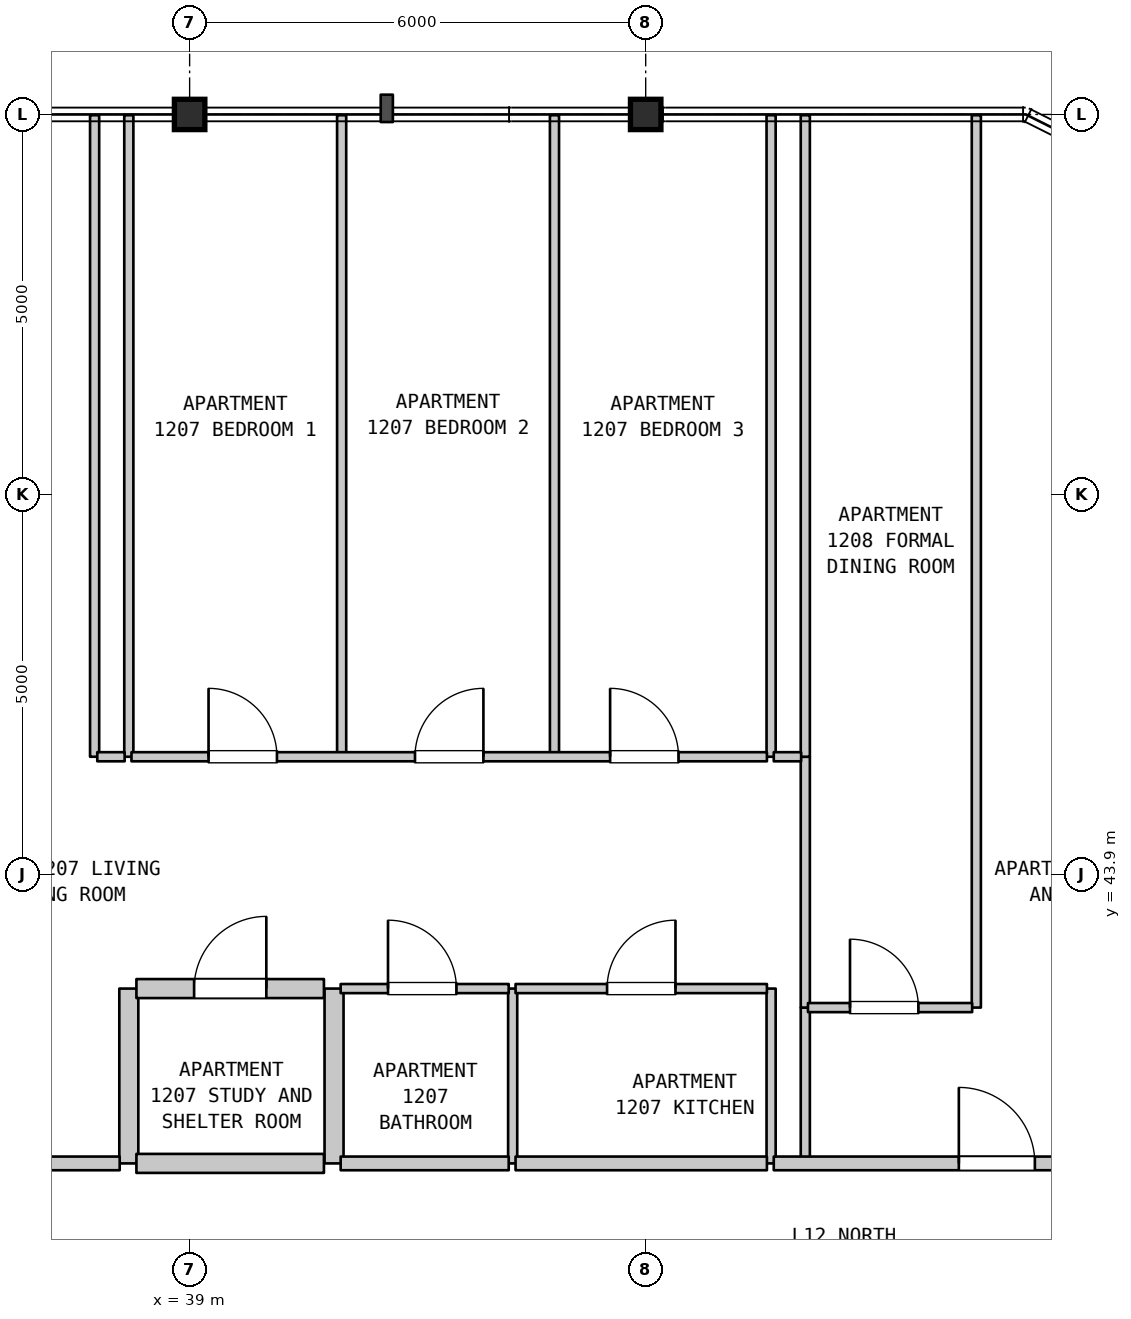
"""IFC4 building model, lengths in metres.
Left out: names, types, materials, properties, quantities, classifications, styles, units other than length and angle.
Written with IfcOpenShell. Run it as: python <this file> out.ifc"""

import sys

from ifc_helpers import new_model, si_unit, direction, frame, frame_2d, origin, origin_2d, place, context, subcontext, project, spatial, rectangle, i_section, extrude, element, fill, save


model = new_model("IFC4")
c1 = context("Model", 3, precision=1e-05, world=origin(), true_north=direction((0.0, 1.0)))
c2 = subcontext(c1, "Body", "Model", "MODEL_VIEW")
j1 = project(units=[si_unit("LENGTHUNIT", "METRE"), si_unit("PLANEANGLEUNIT", "RADIAN")], contexts=[c1])
p1 = place(None, origin())
s1 = spatial("IfcSite", under=j1, at=p1, CompositionType="ELEMENT")
p2 = place(p1, origin())
s2 = spatial("IfcBuilding", under=s1, at=p2, CompositionType="ELEMENT")
p3 = place(p2, frame((0.0, 0.0, 53.6)))
s3 = spatial("IfcBuildingStorey", under=s2, at=p3, CompositionType="ELEMENT", Elevation=53.6)
for number, where, z_axis, x_axis in (
    (1, (39.0, 53.9, 0.0), (0.0, 0.0, 1.0), (1.0, 0.0, 0.0)),
    (2, (45.0, 53.9, 0.0), (0.0, 0.0, 1.0), (1.0, 0.0, 0.0)),
):
    element("IfcColumn", number, at=place(p3, frame(where, z_axis=z_axis, x_axis=x_axis)), inside=s3, PredefinedType="COLUMN", context=c2, shape_type="SweptSolid", body=[
        extrude(i_section(OverallWidth=0.401, OverallDepth=0.399, WebThickness=0.025, FlangeThickness=0.04, FilletRadius=0.015, at=origin_2d()), origin(), (0.0, 0.0, 1.0), 3.7),
    ])
p4 = place(p3, frame((37.75, 45.45, 0.0), z_axis=(0.0, 0.0, 1.0), x_axis=(0.0, 1.0, 0.0)))
e3 = element("IfcWall", 3, at=p4, inside=s3, PredefinedType="PARTITIONING", context=c2, shape_type="SweptSolid", body=[
    extrude(rectangle(XDim=8.44, YDim=0.12, at=frame_2d((4.22, 0.0))), origin(), (0.0, 0.0, 1.0), 3.385),
])
p5 = place(p3, frame((38.2, 40.1, 0.0), z_axis=(0.0, 0.0, 1.0), x_axis=(0.0, 1.0, 0.0)))
e4 = element("IfcWall", 4, at=p5, inside=s3, PredefinedType="STANDARD", context=c2, shape_type="SweptSolid", body=[
    extrude(rectangle(XDim=2.3, YDim=0.25, at=frame_2d((1.15, 0.0))), origin(), (0.0, 0.0, 1.0), 3.385),
])
p6 = place(p3, frame((38.2, 45.45, 0.0), z_axis=(0.0, 0.0, 1.0), x_axis=(0.0, 1.0, 0.0)))
e5 = element("IfcWall", 5, at=p6, inside=s3, PredefinedType="PARTITIONING", context=c2, shape_type="SweptSolid", body=[
    extrude(rectangle(XDim=8.44, YDim=0.12, at=frame_2d((4.22, 0.0))), origin(), (0.0, 0.0, 1.0), 3.385),
])
p7 = place(p3, frame((40.9, 40.1, 0.0), z_axis=(0.0, 0.0, 1.0), x_axis=(0.0, 1.0, 0.0)))
e6 = element("IfcWall", 6, at=p7, inside=s3, PredefinedType="STANDARD", context=c2, shape_type="SweptSolid", body=[
    extrude(rectangle(XDim=2.3, YDim=0.25, at=frame_2d((1.15, 0.0))), origin(), (0.0, 0.0, 1.0), 3.385),
])
p8 = place(p3, frame((41.0, 45.45, 0.0), z_axis=(0.0, 0.0, 1.0), x_axis=(0.0, 1.0, 0.0)))
e7 = element("IfcWall", 7, at=p8, inside=s3, PredefinedType="PARTITIONING", context=c2, shape_type="SweptSolid", body=[
    extrude(rectangle(XDim=8.44, YDim=0.12, at=frame_2d((4.22, 0.0))), origin(), (0.0, 0.0, 1.0), 3.385),
])
p9 = place(p3, frame((43.25, 40.1, 0.0), z_axis=(0.0, 0.0, 1.0), x_axis=(0.0, 1.0, 0.0)))
e8 = element("IfcWall", 8, at=p9, inside=s3, PredefinedType="PARTITIONING", context=c2, shape_type="SweptSolid", body=[
    extrude(rectangle(XDim=2.3, YDim=0.12, at=frame_2d((1.15, 0.0))), origin(), (0.0, 0.0, 1.0), 3.385),
])
p10 = place(p3, frame((43.8, 45.45, 0.0), z_axis=(0.0, 0.0, 1.0), x_axis=(0.0, 1.0, 0.0)))
e9 = element("IfcWall", 9, at=p10, inside=s3, PredefinedType="PARTITIONING", context=c2, shape_type="SweptSolid", body=[
    extrude(rectangle(XDim=8.44, YDim=0.12, at=frame_2d((4.22, 0.0))), origin(), (0.0, 0.0, 1.0), 3.385),
])
p11 = place(p3, frame((46.65, 40.1, 0.0), z_axis=(0.0, 0.0, 1.0), x_axis=(0.0, 1.0, 0.0)))
e10 = element("IfcWall", 10, at=p11, inside=s3, PredefinedType="PARTITIONING", context=c2, shape_type="SweptSolid", body=[
    extrude(rectangle(XDim=2.3, YDim=0.12, at=frame_2d((1.15, 0.0))), origin(), (0.0, 0.0, 1.0), 3.385),
])
p12 = place(p3, frame((46.65, 45.45, 0.0), z_axis=(0.0, 0.0, 1.0), x_axis=(0.0, 1.0, 0.0)))
e11 = element("IfcWall", 11, at=p12, inside=s3, PredefinedType="PARTITIONING", context=c2, shape_type="SweptSolid", body=[
    extrude(rectangle(XDim=8.44, YDim=0.12, at=frame_2d((4.22, 0.0))), origin(), (0.0, 0.0, 1.0), 3.385),
])
p13 = place(p3, frame((47.1, 40.1, 0.0), z_axis=(0.0, 0.0, 1.0), x_axis=(0.0, 1.0, 0.0)))
e12 = element("IfcWall", 12, at=p13, inside=s3, PredefinedType="PARTITIONING", context=c2, shape_type="SweptSolid", body=[
    extrude(rectangle(XDim=2.05, YDim=0.12, at=frame_2d((1.025, 0.0))), origin(), (0.0, 0.0, 1.0), 3.385),
])
p14 = place(p3, frame((47.1, 42.15, 0.0), z_axis=(0.0, 0.0, 1.0), x_axis=(0.0, 1.0, 0.0)))
e13 = element("IfcWall", 13, at=p14, inside=s3, PredefinedType="PARTITIONING", context=c2, shape_type="SweptSolid", body=[
    extrude(rectangle(XDim=3.3, YDim=0.12, at=frame_2d((1.65, 0.0))), origin(), (0.0, 0.0, 1.0), 3.385),
])
p15 = place(p3, frame((47.1, 45.45, 0.0), z_axis=(0.0, 0.0, 1.0), x_axis=(0.0, 1.0, 0.0)))
e14 = element("IfcWall", 14, at=p15, inside=s3, PredefinedType="PARTITIONING", context=c2, shape_type="SweptSolid", body=[
    extrude(rectangle(XDim=8.44, YDim=0.12, at=frame_2d((4.22, 0.0))), origin(), (0.0, 0.0, 1.0), 3.385),
])
p16 = place(p3, frame((49.35, 42.15, 0.0), z_axis=(0.0, 0.0, 1.0), x_axis=(0.0, 1.0, 0.0)))
e15 = element("IfcWall", 15, at=p16, inside=s3, PredefinedType="PARTITIONING", context=c2, shape_type="SweptSolid", body=[
    extrude(rectangle(XDim=11.74, YDim=0.12, at=frame_2d((5.87, 0.0))), origin(), (0.0, 0.0, 1.0), 3.385),
])
p17 = place(p3, frame((32.535, 40.1, 0.0), z_axis=(0.0, 0.0, 1.0), x_axis=(1.0, 0.0, 0.0)))
e16 = element("IfcWall", 16, at=p17, inside=s3, PredefinedType="STANDARD", context=c2, shape_type="SweptSolid", body=[
    extrude(rectangle(XDim=5.545, YDim=0.18, at=frame_2d((2.772, 0.0))), origin(), (0.0, 0.0, 1.0), 3.385),
])
p18 = place(p17, frame((2.435, 0.0, 0.0)))
e17 = element("IfcOpeningElement", 17, at=p18, cuts=e16, PredefinedType="OPENING", context=c2, shape_type="SweptSolid", body=[
    extrude(rectangle(XDim=1.0, YDim=2.15, at=frame_2d((0.5, 1.075))), frame((0.0, 0.1, 0.0), z_axis=(0.0, -1.0, 0.0), x_axis=(1.0, 0.0, 0.0)), (0.0, 0.0, 1.0), 0.2),
])
p19 = place(p3, frame((38.3, 40.1, 0.0), z_axis=(0.0, 0.0, 1.0), x_axis=(1.0, 0.0, 0.0)))
e18 = element("IfcWall", 18, at=p19, inside=s3, PredefinedType="STANDARD", context=c2, shape_type="SweptSolid", body=[
    extrude(rectangle(XDim=2.467, YDim=0.25, at=frame_2d((1.233, 0.0))), origin(), (0.0, 0.0, 1.0), 3.385),
])
p20 = place(p3, frame((40.987, 40.1, 0.0), z_axis=(0.0, 0.0, 1.0), x_axis=(1.0, 0.0, 0.0)))
e19 = element("IfcWall", 19, at=p20, inside=s3, PredefinedType="STANDARD", context=c2, shape_type="SweptSolid", body=[
    extrude(rectangle(XDim=2.211, YDim=0.18, at=frame_2d((1.105, 0.0))), origin(), (0.0, 0.0, 1.0), 3.385),
])
p21 = place(p3, frame((43.288, 40.1, 0.0), z_axis=(0.0, 0.0, 1.0), x_axis=(1.0, 0.0, 0.0)))
e20 = element("IfcWall", 20, at=p21, inside=s3, PredefinedType="STANDARD", context=c2, shape_type="SweptSolid", body=[
    extrude(rectangle(XDim=3.307, YDim=0.18, at=frame_2d((1.653, 0.0))), origin(), (0.0, 0.0, 1.0), 3.385),
])
p22 = place(p3, frame((46.685, 40.1, 0.0), z_axis=(0.0, 0.0, 1.0), x_axis=(1.0, 0.0, 0.0)))
e21 = element("IfcWall", 21, at=p22, inside=s3, PredefinedType="STANDARD", context=c2, shape_type="SweptSolid", body=[
    extrude(rectangle(XDim=5.61, YDim=0.18, at=frame_2d((2.805, 0.0))), origin(), (0.0, 0.0, 1.0), 3.385),
])
p23 = place(p22, frame((2.435, 0.0, 0.0)))
e22 = element("IfcOpeningElement", 22, at=p23, cuts=e21, PredefinedType="OPENING", context=c2, shape_type="SweptSolid", body=[
    extrude(rectangle(XDim=1.0, YDim=2.15, at=frame_2d((0.5, 1.075))), frame((0.0, 0.1, 0.0), z_axis=(0.0, -1.0, 0.0), x_axis=(1.0, 0.0, 0.0)), (0.0, 0.0, 1.0), 0.2),
])
p24 = place(p3, frame((47.135, 42.15, 0.0), z_axis=(0.0, 0.0, 1.0), x_axis=(1.0, 0.0, 0.0)))
e23 = element("IfcWall", 23, at=p24, inside=s3, PredefinedType="PARTITIONING", context=c2, shape_type="SweptSolid", body=[
    extrude(rectangle(XDim=2.16, YDim=0.12, at=frame_2d((1.08, 0.0))), origin(), (0.0, 0.0, 1.0), 3.385),
])
p25 = place(p24, frame((0.553, 0.0, 0.0)))
e24 = element("IfcOpeningElement", 24, at=p25, cuts=e23, PredefinedType="OPENING", context=c2, shape_type="SweptSolid", body=[
    extrude(rectangle(XDim=0.9, YDim=2.15, at=frame_2d((0.45, 1.075))), frame((0.0, 0.07, 0.0), z_axis=(0.0, -1.0, 0.0), x_axis=(1.0, 0.0, 0.0)), (0.0, 0.0, 1.0), 0.14),
])
p26 = place(p3, frame((38.3, 42.4, 0.0), z_axis=(0.0, 0.0, 1.0), x_axis=(1.0, 0.0, 0.0)))
e25 = element("IfcWall", 25, at=p26, inside=s3, PredefinedType="STANDARD", context=c2, shape_type="SweptSolid", body=[
    extrude(rectangle(XDim=2.467, YDim=0.25, at=frame_2d((1.233, 0.0))), origin(), (0.0, 0.0, 1.0), 3.385),
])
p27 = place(p26, frame((0.759, 0.0, 0.0)))
e26 = element("IfcOpeningElement", 26, at=p27, cuts=e25, PredefinedType="OPENING", context=c2, shape_type="SweptSolid", body=[
    extrude(rectangle(XDim=0.95, YDim=2.15, at=frame_2d((0.475, 1.075))), frame((0.0, 0.135, 0.0), z_axis=(0.0, -1.0, 0.0), x_axis=(1.0, 0.0, 0.0)), (0.0, 0.0, 1.0), 0.27),
])
p28 = place(p3, frame((40.987, 42.4, 0.0), z_axis=(0.0, 0.0, 1.0), x_axis=(1.0, 0.0, 0.0)))
e27 = element("IfcWall", 27, at=p28, inside=s3, PredefinedType="PARTITIONING", context=c2, shape_type="SweptSolid", body=[
    extrude(rectangle(XDim=2.211, YDim=0.12, at=frame_2d((1.105, 0.0))), origin(), (0.0, 0.0, 1.0), 3.385),
])
p29 = place(p28, frame((0.623, 0.0, 0.0)))
e28 = element("IfcOpeningElement", 28, at=p29, cuts=e27, PredefinedType="OPENING", context=c2, shape_type="SweptSolid", body=[
    extrude(rectangle(XDim=0.9, YDim=2.1, at=frame_2d((0.45, 1.05))), frame((0.0, 0.07, 0.0), z_axis=(0.0, -1.0, 0.0), x_axis=(1.0, 0.0, 0.0)), (0.0, 0.0, 1.0), 0.14),
])
p30 = place(p3, frame((43.288, 42.4, 0.0), z_axis=(0.0, 0.0, 1.0), x_axis=(1.0, 0.0, 0.0)))
e29 = element("IfcWall", 29, at=p30, inside=s3, PredefinedType="PARTITIONING", context=c2, shape_type="SweptSolid", body=[
    extrude(rectangle(XDim=3.307, YDim=0.12, at=frame_2d((1.653, 0.0))), origin(), (0.0, 0.0, 1.0), 3.385),
])
p31 = place(p30, frame((1.204, 0.0, 0.0)))
e30 = element("IfcOpeningElement", 30, at=p31, cuts=e29, PredefinedType="OPENING", context=c2, shape_type="SweptSolid", body=[
    extrude(rectangle(XDim=0.9, YDim=2.15, at=frame_2d((0.45, 1.075))), frame((0.0, 0.07, 0.0), z_axis=(0.0, -1.0, 0.0), x_axis=(1.0, 0.0, 0.0)), (0.0, 0.0, 1.0), 0.14),
])
p32 = place(p3, frame((37.785, 45.45, 0.0), z_axis=(0.0, 0.0, 1.0), x_axis=(1.0, 0.0, 0.0)))
e31 = element("IfcWall", 31, at=p32, inside=s3, PredefinedType="PARTITIONING", context=c2, shape_type="SweptSolid", body=[
    extrude(rectangle(XDim=0.36, YDim=0.12, at=frame_2d((0.18, 0.0))), origin(), (0.0, 0.0, 1.0), 3.385),
])
p33 = place(p3, frame((38.235, 45.45, 0.0), z_axis=(0.0, 0.0, 1.0), x_axis=(1.0, 0.0, 0.0)))
e32 = element("IfcWall", 32, at=p33, inside=s3, PredefinedType="PARTITIONING", context=c2, shape_type="SweptSolid", body=[
    extrude(rectangle(XDim=8.36, YDim=0.12, at=frame_2d((4.18, 0.0))), origin(), (0.0, 0.0, 1.0), 3.385),
])
p34 = place(p33, frame((1.014, 0.0, 0.0)))
e33 = element("IfcOpeningElement", 33, at=p34, cuts=e32, PredefinedType="OPENING", context=c2, shape_type="SweptSolid", body=[
    extrude(rectangle(XDim=0.9, YDim=2.15, at=frame_2d((0.45, 1.075))), frame((0.0, 0.07, 0.0), z_axis=(0.0, -1.0, 0.0), x_axis=(1.0, 0.0, 0.0)), (0.0, 0.0, 1.0), 0.14),
])
p35 = place(p33, frame((3.73, 0.0, 0.0)))
e34 = element("IfcOpeningElement", 34, at=p35, cuts=e32, PredefinedType="OPENING", context=c2, shape_type="SweptSolid", body=[
    extrude(rectangle(XDim=0.9, YDim=2.15, at=frame_2d((0.45, 1.075))), frame((0.0, 0.07, 0.0), z_axis=(0.0, -1.0, 0.0), x_axis=(1.0, 0.0, 0.0)), (0.0, 0.0, 1.0), 0.14),
])
p36 = place(p33, frame((6.297, 0.0, 0.0)))
e35 = element("IfcOpeningElement", 35, at=p36, cuts=e32, PredefinedType="OPENING", context=c2, shape_type="SweptSolid", body=[
    extrude(rectangle(XDim=0.9, YDim=2.15, at=frame_2d((0.45, 1.075))), frame((0.0, 0.07, 0.0), z_axis=(0.0, -1.0, 0.0), x_axis=(1.0, 0.0, 0.0)), (0.0, 0.0, 1.0), 0.14),
])
p37 = place(p3, frame((46.685, 45.45, 0.0), z_axis=(0.0, 0.0, 1.0), x_axis=(1.0, 0.0, 0.0)))
e36 = element("IfcWall", 36, at=p37, inside=s3, PredefinedType="PARTITIONING", context=c2, shape_type="SweptSolid", body=[
    extrude(rectangle(XDim=0.36, YDim=0.12, at=frame_2d((0.18, 0.0))), origin(), (0.0, 0.0, 1.0), 3.385),
])
p38 = place(p23, origin())
e37 = element("IfcDoor", 37, at=p38, inside=s3, OperationType="SINGLE_SWING_LEFT", PredefinedType="DOOR", context=c2, shape_type="SweptSolid", body=[
    extrude(rectangle(XDim=1.0, YDim=2.15, at=frame_2d((0.5, 1.075))), frame((0.0, 0.025, 0.0), z_axis=(0.0, -1.0, 0.0), x_axis=(1.0, 0.0, 0.0)), (0.0, 0.0, 1.0), 0.05),
])
fill(e22, e37)
p39 = place(p25, origin())
e38 = element("IfcDoor", 38, at=p39, inside=s3, OperationType="SINGLE_SWING_LEFT", PredefinedType="DOOR", context=c2, shape_type="SweptSolid", body=[
    extrude(rectangle(XDim=0.9, YDim=2.15, at=frame_2d((0.45, 1.075))), frame((0.0, 0.025, 0.0), z_axis=(0.0, -1.0, 0.0), x_axis=(1.0, 0.0, 0.0)), (0.0, 0.0, 1.0), 0.05),
])
fill(e24, e38)
p40 = place(p27, origin())
e39 = element("IfcDoor", 39, at=p40, inside=s3, OperationType="SINGLE_SWING_RIGHT", PredefinedType="DOOR", context=c2, shape_type="SweptSolid", body=[
    extrude(rectangle(XDim=0.95, YDim=2.15, at=frame_2d((0.475, 1.075))), frame((0.0, 0.025, 0.0), z_axis=(0.0, -1.0, 0.0), x_axis=(1.0, 0.0, 0.0)), (0.0, 0.0, 1.0), 0.05),
])
fill(e26, e39)
p41 = place(p29, origin())
e40 = element("IfcDoor", 40, at=p41, inside=s3, OperationType="SINGLE_SWING_LEFT", PredefinedType="DOOR", context=c2, shape_type="SweptSolid", body=[
    extrude(rectangle(XDim=0.9, YDim=2.1, at=frame_2d((0.45, 1.05))), frame((0.0, 0.025, 0.0), z_axis=(0.0, -1.0, 0.0), x_axis=(1.0, 0.0, 0.0)), (0.0, 0.0, 1.0), 0.05),
])
fill(e28, e40)
p42 = place(p31, origin())
e41 = element("IfcDoor", 41, at=p42, inside=s3, OperationType="SINGLE_SWING_RIGHT", PredefinedType="DOOR", context=c2, shape_type="SweptSolid", body=[
    extrude(rectangle(XDim=0.9, YDim=2.15, at=frame_2d((0.45, 1.075))), frame((0.0, 0.025, 0.0), z_axis=(0.0, -1.0, 0.0), x_axis=(1.0, 0.0, 0.0)), (0.0, 0.0, 1.0), 0.05),
])
fill(e30, e41)
p43 = place(p34, origin())
e42 = element("IfcDoor", 42, at=p43, inside=s3, OperationType="SINGLE_SWING_LEFT", PredefinedType="DOOR", context=c2, shape_type="SweptSolid", body=[
    extrude(rectangle(XDim=0.9, YDim=2.15, at=frame_2d((0.45, 1.075))), frame((0.0, 0.025, 0.0), z_axis=(0.0, -1.0, 0.0), x_axis=(1.0, 0.0, 0.0)), (0.0, 0.0, 1.0), 0.05),
])
fill(e33, e42)
p44 = place(p35, origin())
e43 = element("IfcDoor", 43, at=p44, inside=s3, OperationType="SINGLE_SWING_RIGHT", PredefinedType="DOOR", context=c2, shape_type="SweptSolid", body=[
    extrude(rectangle(XDim=0.9, YDim=2.15, at=frame_2d((0.45, 1.075))), frame((0.0, 0.025, 0.0), z_axis=(0.0, -1.0, 0.0), x_axis=(1.0, 0.0, 0.0)), (0.0, 0.0, 1.0), 0.05),
])
fill(e34, e43)
p45 = place(p36, origin())
e44 = element("IfcDoor", 44, at=p45, inside=s3, OperationType="SINGLE_SWING_LEFT", PredefinedType="DOOR", context=c2, shape_type="SweptSolid", body=[
    extrude(rectangle(XDim=0.9, YDim=2.15, at=frame_2d((0.45, 1.075))), frame((0.0, 0.025, 0.0), z_axis=(0.0, -1.0, 0.0), x_axis=(1.0, 0.0, 0.0)), (0.0, 0.0, 1.0), 0.05),
])
fill(e35, e44)
save(model, sys.argv[1])
